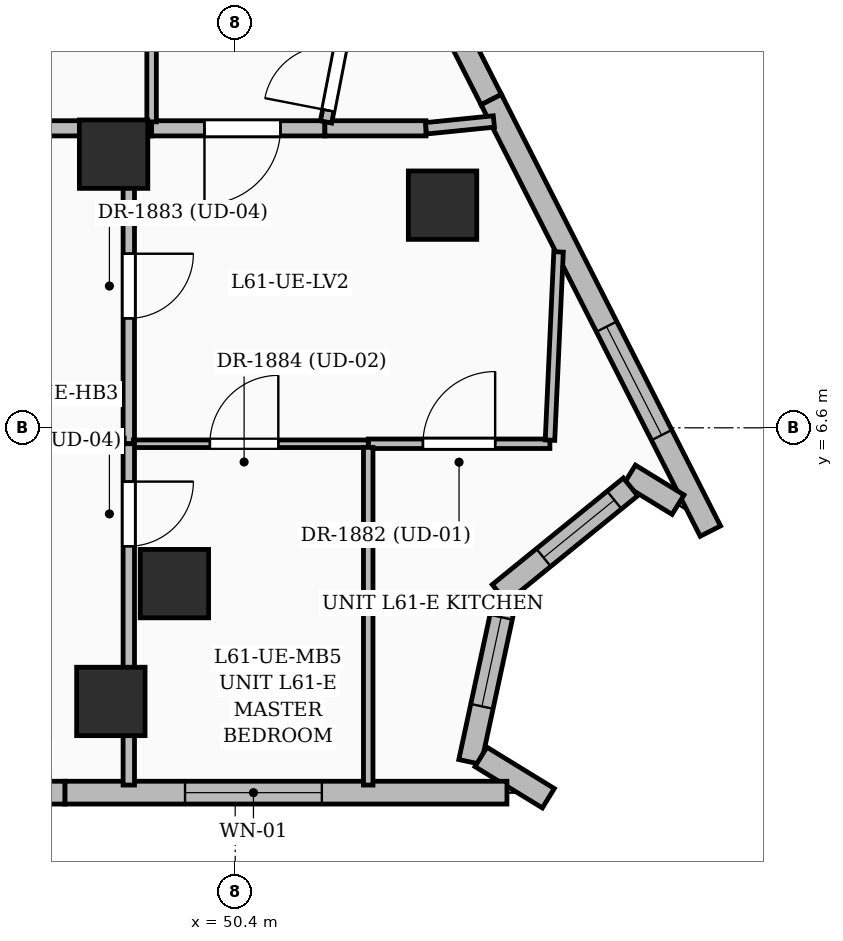
"""IFC4 building model, lengths in metres.
Left out: names, types, materials, properties, quantities, classifications, styles, units other than length and angle.
Written with IfcOpenShell. Run it as: python <this file> out.ifc"""

import sys

from ifc_helpers import new_model, si_unit, direction, frame, frame_2d, origin, origin_2d, place, context, subcontext, project, spatial, rectangle, extrude, element, fill, save


model = new_model("IFC4")
c1 = context("Model", 3, precision=1e-05, world=origin(), true_north=direction((0.0, 1.0)))
c2 = subcontext(c1, "Body", "Model", "MODEL_VIEW")
j1 = project(units=[si_unit("LENGTHUNIT", "METRE"), si_unit("PLANEANGLEUNIT", "RADIAN")], contexts=[c1])
p1 = place(None, origin())
s1 = spatial("IfcSite", under=j1, at=p1, CompositionType="ELEMENT")
p2 = place(p1, origin())
s2 = spatial("IfcBuilding", under=s1, at=p2, CompositionType="ELEMENT")
p3 = place(p2, frame((0.0, 0.0, 237.0)))
s3 = spatial("IfcBuildingStorey", under=s2, at=p3, CompositionType="ELEMENT", Elevation=237.0)
for number, where, z_axis, x_axis in (
    (1, (49.6, 4.55, 0.0), (0.0, 0.0, 1.0), (1.0, 0.0, 0.0)),
    (2, (48.8, 10.2, 0.0), (0.0, 0.0, 1.0), (1.0, 0.0, 0.0)),
    (3, (48.764, 3.0, 0.0), (0.0, 0.0, 1.0), (1.0, 0.0, 0.0)),
    (4, (53.128, 9.529, 0.0), (0.0, 0.0, 1.0), (1.0, 0.0, 0.0)),
):
    element("IfcColumn", number, at=place(p3, frame(where, z_axis=z_axis, x_axis=x_axis)), inside=s3, PredefinedType="COLUMN", context=c2, shape_type="SweptSolid", body=[
        extrude(rectangle(XDim=0.9, YDim=0.9, at=origin_2d()), origin(), (0.0, 0.0, 1.0), 3.75),
    ])
p4 = place(p3, frame((51.01, 16.349, 0.0), z_axis=(0.0, 0.0, 1.0), x_axis=(0.452847757291, -0.891587858103, 0.0)))
e5 = element("IfcWall", 5, at=p4, inside=s3, PredefinedType="SOLIDWALL", context=c2, shape_type="SweptSolid", body=[
    extrude(rectangle(XDim=6.092, YDim=0.3, at=frame_2d((3.046, 0.0))), origin(), (0.0, 0.0, 1.0), 3.5),
])
p5 = place(p4, frame((3.35, 0.0, 0.6)))
e6 = element("IfcOpeningElement", 6, at=p5, cuts=e5, PredefinedType="OPENING", context=c2, shape_type="SweptSolid", body=[
    extrude(rectangle(XDim=1.8, YDim=2.1, at=frame_2d((0.9, 1.05))), frame((0.0, 0.16, 0.0), z_axis=(0.0, -1.0, 0.0), x_axis=(1.0, 0.0, 0.0)), (0.0, 0.0, 1.0), 0.32),
])
p6 = place(p3, frame((53.769, 10.917, 0.0), z_axis=(0.0, 0.0, 1.0), x_axis=(0.452819004825, -0.891602461229, 0.0)))
e7 = element("IfcWall", 7, at=p6, inside=s3, PredefinedType="SOLIDWALL", context=c2, shape_type="SweptSolid", body=[
    extrude(rectangle(XDim=6.366, YDim=0.3, at=frame_2d((3.183, 0.0))), origin(), (0.0, 0.0, 1.0), 3.5),
])
p7 = place(p6, frame((3.35, 0.0, 0.55)))
e8 = element("IfcOpeningElement", 8, at=p7, cuts=e7, PredefinedType="OPENING", context=c2, shape_type="SweptSolid", body=[
    extrude(rectangle(XDim=1.6, YDim=2.2, at=frame_2d((0.8, 1.1))), frame((0.0, 0.16, 0.0), z_axis=(0.0, -1.0, 0.0), x_axis=(1.0, 0.0, 0.0)), (0.0, 0.0, 1.0), 0.32),
])
p8 = place(p3, frame((56.226, 5.588, 0.0), z_axis=(0.0, 0.0, 1.0), x_axis=(-0.851959856167, 0.523607107935, 0.0)))
e9 = element("IfcWall", 9, at=p8, inside=s3, PredefinedType="SOLIDWALL", context=c2, shape_type="SweptSolid", body=[
    extrude(rectangle(XDim=0.75, YDim=0.3, at=frame_2d((0.375, 0.0))), origin(), (0.0, 0.0, 1.0), 3.5),
])
p9 = place(p3, frame((55.601, 5.823, 0.0), z_axis=(0.0, 0.0, 1.0), x_axis=(-0.775969517168, -0.630770408648, 0.0)))
e10 = element("IfcWall", 10, at=p9, inside=s3, PredefinedType="SOLIDWALL", context=c2, shape_type="SweptSolid", body=[
    extrude(rectangle(XDim=2.223, YDim=0.3, at=frame_2d((1.111, 0.0))), origin(), (0.0, 0.0, 1.0), 3.5),
])
p10 = place(p9, frame((0.275, 0.0, 0.8)))
e11 = element("IfcOpeningElement", 11, at=p10, cuts=e10, PredefinedType="OPENING", context=c2, shape_type="SweptSolid", body=[
    extrude(rectangle(XDim=1.2, YDim=1.8, at=frame_2d((0.6, 0.9))), frame((0.0, 0.16, 0.0), z_axis=(0.0, -1.0, 0.0), x_axis=(1.0, 0.0, 0.0)), (0.0, 0.0, 1.0), 0.32),
])
p11 = place(p3, frame((53.951, 4.353, 0.0), z_axis=(0.0, 0.0, 1.0), x_axis=(-0.210621406129, -0.977567707773, 0.0)))
e12 = element("IfcWall", 12, at=p11, inside=s3, PredefinedType="SOLIDWALL", context=c2, shape_type="SweptSolid", body=[
    extrude(rectangle(XDim=2.198, YDim=0.3, at=frame_2d((1.099, 0.0))), origin(), (0.0, 0.0, 1.0), 3.5),
])
p12 = place(p11, frame((0.25, 0.0, 0.8)))
e13 = element("IfcOpeningElement", 13, at=p12, cuts=e12, PredefinedType="OPENING", context=c2, shape_type="SweptSolid", body=[
    extrude(rectangle(XDim=1.2, YDim=1.8, at=frame_2d((0.6, 0.9))), frame((0.0, 0.16, 0.0), z_axis=(0.0, -1.0, 0.0), x_axis=(1.0, 0.0, 0.0)), (0.0, 0.0, 1.0), 0.32),
])
p13 = place(p3, frame((53.633, 2.271, 0.0), z_axis=(0.0, 0.0, 1.0), x_axis=(0.852375061926, -0.522930926421, 0.0)))
e14 = element("IfcWall", 14, at=p13, inside=s3, PredefinedType="SOLIDWALL", context=c2, shape_type="SweptSolid", body=[
    extrude(rectangle(XDim=1.04, YDim=0.3, at=frame_2d((0.52, 0.0))), origin(), (0.0, 0.0, 1.0), 3.5),
])
p14 = place(p3, frame((53.975, 1.8, 0.0), z_axis=(0.0, 0.0, 1.0), x_axis=(-1.0, 0.0, 0.0)))
e15 = element("IfcWall", 15, at=p14, inside=s3, PredefinedType="SOLIDWALL", context=c2, shape_type="SweptSolid", body=[
    extrude(rectangle(XDim=5.816, YDim=0.3, at=frame_2d((2.908, 0.0))), origin(), (0.0, 0.0, 1.0), 3.5),
])
p15 = place(p14, frame((2.435, 0.0, 0.6)))
e16 = element("IfcOpeningElement", 16, at=p15, cuts=e15, PredefinedType="OPENING", context=c2, shape_type="SweptSolid", body=[
    extrude(rectangle(XDim=1.8, YDim=2.1, at=frame_2d((0.9, 1.05))), frame((0.0, 0.16, 0.0), z_axis=(0.0, -1.0, 0.0), x_axis=(1.0, 0.0, 0.0)), (0.0, 0.0, 1.0), 0.32),
])
p16 = place(p3, frame((48.159, 1.8, 0.0), z_axis=(0.0, 0.0, 1.0), x_axis=(-1.0, 0.0, 0.0)))
e17 = element("IfcWall", 17, at=p16, inside=s3, PredefinedType="SOLIDWALL", context=c2, shape_type="SweptSolid", body=[
    extrude(rectangle(XDim=6.381, YDim=0.3, at=frame_2d((3.191, 0.0))), origin(), (0.0, 0.0, 1.0), 3.5),
])
p17 = place(p16, frame((2.85, 0.0, 0.55)))
e18 = element("IfcOpeningElement", 18, at=p17, cuts=e17, PredefinedType="OPENING", context=c2, shape_type="SweptSolid", body=[
    extrude(rectangle(XDim=1.6, YDim=2.2, at=frame_2d((0.8, 1.1))), frame((0.0, 0.16, 0.0), z_axis=(0.0, -1.0, 0.0), x_axis=(1.0, 0.0, 0.0)), (0.0, 0.0, 1.0), 0.32),
])
p18 = place(p3, frame((49.0, 10.54, 0.0), z_axis=(0.0, 0.0, 1.0), x_axis=(0.0, -1.0, 0.0)))
e19 = element("IfcWall", 19, at=p18, inside=s3, PredefinedType="PARTITIONING", context=c2, shape_type="SweptSolid", body=[
    extrude(rectangle(XDim=4.15, YDim=0.15, at=frame_2d((2.075, 0.0))), origin(), (0.0, 0.0, 1.0), 3.5),
])
p19 = place(p18, frame((1.65, 0.0, 0.0)))
e20 = element("IfcOpeningElement", 20, at=p19, cuts=e19, PredefinedType="OPENING", context=c2, shape_type="SweptSolid", body=[
    extrude(rectangle(XDim=0.85, YDim=2.1, at=frame_2d((0.425, 1.05))), frame((0.0, 0.085, 0.0), z_axis=(0.0, -1.0, 0.0), x_axis=(1.0, 0.0, 0.0)), (0.0, 0.0, 1.0), 0.17),
])
p20 = place(p3, frame((52.15, 6.39, 0.0), z_axis=(0.0, 0.0, 1.0), x_axis=(1.0, 0.0, 0.0)))
e21 = element("IfcWall", 21, at=p20, inside=s3, PredefinedType="PARTITIONING", context=c2, shape_type="SweptSolid", body=[
    extrude(rectangle(XDim=2.39, YDim=0.125, at=frame_2d((1.195, 0.0))), origin(), (0.0, 0.0, 1.0), 3.5),
])
p21 = place(p20, frame((0.72, 0.0, 0.0)))
e22 = element("IfcOpeningElement", 22, at=p21, cuts=e21, PredefinedType="OPENING", context=c2, shape_type="SweptSolid", body=[
    extrude(rectangle(XDim=0.95, YDim=2.2, at=frame_2d((0.475, 1.1))), frame((0.0, 0.072, 0.0), z_axis=(0.0, -1.0, 0.0), x_axis=(1.0, 0.0, 0.0)), (0.0, 0.0, 1.0), 0.145),
])
p22 = place(p3, frame((54.541, 6.438, 0.0), z_axis=(0.0, 0.0, 1.0), x_axis=(0.045497001929, 0.998964475252, 0.0)))
e23 = element("IfcWall", 23, at=p22, inside=s3, PredefinedType="PARTITIONING", context=c2, shape_type="SweptSolid", body=[
    extrude(rectangle(XDim=2.479, YDim=0.125, at=frame_2d((1.24, 0.0))), origin(), (0.0, 0.0, 1.0), 3.5),
])
p23 = place(p3, frame((49.06, 6.39, 0.0), z_axis=(0.0, 0.0, 1.0), x_axis=(1.0, 0.0, 0.0)))
e24 = element("IfcWall", 24, at=p23, inside=s3, PredefinedType="PARTITIONING", context=c2, shape_type="SweptSolid", body=[
    extrude(rectangle(XDim=3.09, YDim=0.1, at=frame_2d((1.545, 0.0))), origin(), (0.0, 0.0, 1.0), 2.82),
])
p24 = place(p23, frame((1.007, 0.0, 0.0)))
e25 = element("IfcOpeningElement", 25, at=p24, cuts=e24, PredefinedType="OPENING", context=c2, shape_type="SweptSolid", body=[
    extrude(rectangle(XDim=0.9, YDim=2.15, at=frame_2d((0.45, 1.075))), frame((0.0, 0.06, 0.0), z_axis=(0.0, -1.0, 0.0), x_axis=(1.0, 0.0, 0.0)), (0.0, 0.0, 1.0), 0.12),
])
p25 = place(p3, frame((49.3, 10.54, 0.0), z_axis=(0.0, 0.0, 1.0), x_axis=(-1.0, 0.0, 0.0)))
e26 = element("IfcWall", 26, at=p25, inside=s3, PredefinedType="PARTITIONING", context=c2, shape_type="SweptSolid", body=[
    extrude(rectangle(XDim=0.3, YDim=0.2, at=frame_2d((0.15, 0.0))), origin(), (0.0, 0.0, 1.0), 3.5),
])
p26 = place(p3, frame((51.58, 10.54, 0.0), z_axis=(0.0, 0.0, 1.0), x_axis=(-1.0, 0.0, 0.0)))
e27 = element("IfcWall", 27, at=p26, inside=s3, PredefinedType="PARTITIONING", context=c2, shape_type="SweptSolid", body=[
    extrude(rectangle(XDim=2.28, YDim=0.2, at=frame_2d((1.14, 0.0))), origin(), (0.0, 0.0, 1.0), 3.16),
])
p27 = place(p26, frame((0.584, 0.0, 0.0)))
e28 = element("IfcOpeningElement", 28, at=p27, cuts=e27, PredefinedType="OPENING", context=c2, shape_type="SweptSolid", body=[
    extrude(rectangle(XDim=1.0, YDim=2.2, at=frame_2d((0.5, 1.1))), frame((0.0, 0.11, 0.0), z_axis=(0.0, -1.0, 0.0), x_axis=(1.0, 0.0, 0.0)), (0.0, 0.0, 1.0), 0.22),
])
p28 = place(p3, frame((52.91, 10.54, 0.0), z_axis=(0.0, 0.0, 1.0), x_axis=(-1.0, 0.0, 0.0)))
e29 = element("IfcWall", 29, at=p28, inside=s3, PredefinedType="PARTITIONING", context=c2, shape_type="SweptSolid", body=[
    extrude(rectangle(XDim=1.33, YDim=0.2, at=frame_2d((0.665, 0.0))), origin(), (0.0, 0.0, 1.0), 2.82),
])
p29 = place(p3, frame((47.35, 6.39, 0.0), z_axis=(0.0, 0.0, 1.0), x_axis=(1.0, 0.0, 0.0)))
e30 = element("IfcWall", 30, at=p29, inside=s3, PredefinedType="PARTITIONING", context=c2, shape_type="SweptSolid", body=[
    extrude(rectangle(XDim=1.59, YDim=0.15, at=frame_2d((0.795, 0.0))), origin(), (0.0, 0.0, 1.0), 2.685),
])
p30 = place(p3, frame((48.94, 10.54, 0.0), z_axis=(0.0, 0.0, 1.0), x_axis=(-1.0, 0.0, 0.0)))
e31 = element("IfcWall", 31, at=p30, inside=s3, PredefinedType="PARTITIONING", context=c2, shape_type="SweptSolid", body=[
    extrude(rectangle(XDim=1.59, YDim=0.2, at=frame_2d((0.795, 0.0))), origin(), (0.0, 0.0, 1.0), 3.5),
])
p31 = place(p3, frame((52.15, 6.343, 0.0), z_axis=(0.0, 0.0, 1.0), x_axis=(0.0, -1.0, 0.0)))
e32 = element("IfcWall", 32, at=p31, inside=s3, PredefinedType="PARTITIONING", context=c2, shape_type="SweptSolid", body=[
    extrude(rectangle(XDim=4.443, YDim=0.125, at=frame_2d((2.221, 0.0))), origin(), (0.0, 0.0, 1.0), 3.5),
])
p32 = place(p3, frame((49.0, 6.39, 0.0), z_axis=(0.0, 0.0, 1.0), x_axis=(0.0, -1.0, 0.0)))
e33 = element("IfcWall", 33, at=p32, inside=s3, PredefinedType="PARTITIONING", context=c2, shape_type="SweptSolid", body=[
    extrude(rectangle(XDim=4.49, YDim=0.15, at=frame_2d((2.245, 0.0))), origin(), (0.0, 0.0, 1.0), 2.685),
])
p33 = place(p32, frame((0.498, 0.0, 0.0)))
e34 = element("IfcOpeningElement", 34, at=p33, cuts=e33, PredefinedType="OPENING", context=c2, shape_type="SweptSolid", body=[
    extrude(rectangle(XDim=0.85, YDim=2.1, at=frame_2d((0.425, 1.05))), frame((0.0, 0.085, 0.0), z_axis=(0.0, -1.0, 0.0), x_axis=(1.0, 0.0, 0.0)), (0.0, 0.0, 1.0), 0.17),
])
p34 = place(p3, frame((49.3, 10.625, 0.0), z_axis=(0.0, 0.0, 1.0), x_axis=(0.0, 1.0, 0.0)))
e35 = element("IfcWall", 35, at=p34, inside=s3, PredefinedType="PARTITIONING", context=c2, shape_type="SweptSolid", body=[
    extrude(rectangle(XDim=3.055, YDim=0.125, at=frame_2d((1.527, 0.0))), origin(), (0.0, 0.0, 1.0), 3.16),
])
p35 = place(p34, frame((1.01, 0.0, 0.0)))
e36 = element("IfcOpeningElement", 36, at=p35, cuts=e35, PredefinedType="OPENING", context=c2, shape_type="SweptSolid", body=[
    extrude(rectangle(XDim=0.95, YDim=2.2, at=frame_2d((0.475, 1.1))), frame((0.0, 0.072, 0.0), z_axis=(0.0, -1.0, 0.0), x_axis=(1.0, 0.0, 0.0)), (0.0, 0.0, 1.0), 0.145),
])
p36 = place(p3, frame((51.595, 10.624, 0.0), z_axis=(0.0, 0.0, 1.0), x_axis=(0.190970447777, 0.981595786501, 0.0)))
e37 = element("IfcWall", 37, at=p36, inside=s3, PredefinedType="PARTITIONING", context=c2, shape_type="SweptSolid", body=[
    extrude(rectangle(XDim=3.177, YDim=0.15, at=frame_2d((1.588, 0.0))), origin(), (0.0, 0.0, 1.0), 2.82),
])
p37 = place(p36, frame((0.154, 0.0, 0.0)))
e38 = element("IfcOpeningElement", 38, at=p37, cuts=e37, PredefinedType="OPENING", context=c2, shape_type="SweptSolid", body=[
    extrude(rectangle(XDim=0.85, YDim=2.1, at=frame_2d((0.425, 1.05))), frame((0.0, 0.085, 0.0), z_axis=(0.0, -1.0, 0.0), x_axis=(1.0, 0.0, 0.0)), (0.0, 0.0, 1.0), 0.17),
])
p38 = place(p3, frame((52.91, 10.54, 0.0), z_axis=(0.0, 0.0, 1.0), x_axis=(0.994977766191, 0.100096177681, 0.0)))
e39 = element("IfcWall", 39, at=p38, inside=s3, PredefinedType="PARTITIONING", context=c2, shape_type="SweptSolid", body=[
    extrude(rectangle(XDim=0.897, YDim=0.15, at=frame_2d((0.449, 0.0))), origin(), (0.0, 0.0, 1.0), 3.5),
])
p39 = place(p7, origin())
e40 = element("IfcWindow", 40, at=p39, inside=s3, PartitioningType="SINGLE_PANEL", PredefinedType="WINDOW", context=c2, shape_type="SweptSolid", body=[
    extrude(rectangle(XDim=1.6, YDim=2.2, at=frame_2d((0.8, 1.1))), frame((0.0, 0.03, 0.0), z_axis=(0.0, -1.0, 0.0), x_axis=(1.0, 0.0, 0.0)), (0.0, 0.0, 1.0), 0.06),
])
fill(e8, e40)
p40 = place(p10, origin())
e41 = element("IfcWindow", 41, at=p40, inside=s3, PartitioningType="SINGLE_PANEL", PredefinedType="WINDOW", context=c2, shape_type="SweptSolid", body=[
    extrude(rectangle(XDim=1.2, YDim=1.8, at=frame_2d((0.6, 0.9))), frame((0.0, 0.03, 0.0), z_axis=(0.0, -1.0, 0.0), x_axis=(1.0, 0.0, 0.0)), (0.0, 0.0, 1.0), 0.06),
])
fill(e11, e41)
p41 = place(p12, origin())
e42 = element("IfcWindow", 42, at=p41, inside=s3, PartitioningType="SINGLE_PANEL", PredefinedType="WINDOW", context=c2, shape_type="SweptSolid", body=[
    extrude(rectangle(XDim=1.2, YDim=1.8, at=frame_2d((0.6, 0.9))), frame((0.0, 0.03, 0.0), z_axis=(0.0, -1.0, 0.0), x_axis=(1.0, 0.0, 0.0)), (0.0, 0.0, 1.0), 0.06),
])
fill(e13, e42)
p42 = place(p15, origin())
e43 = element("IfcWindow", 43, at=p42, inside=s3, PartitioningType="SINGLE_PANEL", PredefinedType="WINDOW", context=c2, shape_type="SweptSolid", body=[
    extrude(rectangle(XDim=1.8, YDim=2.1, at=frame_2d((0.9, 1.05))), frame((0.0, 0.03, 0.0), z_axis=(0.0, -1.0, 0.0), x_axis=(1.0, 0.0, 0.0)), (0.0, 0.0, 1.0), 0.06),
])
fill(e16, e43)
p43 = place(p21, origin())
e44 = element("IfcDoor", 44, at=p43, inside=s3, OperationType="SINGLE_SWING_RIGHT", PredefinedType="DOOR", context=c2, shape_type="SweptSolid", body=[
    extrude(rectangle(XDim=0.95, YDim=2.2, at=frame_2d((0.475, 1.1))), frame((0.0, 0.025, 0.0), z_axis=(0.0, -1.0, 0.0), x_axis=(1.0, 0.0, 0.0)), (0.0, 0.0, 1.0), 0.05),
])
fill(e22, e44)
p44 = place(p19, origin())
e45 = element("IfcDoor", 45, at=p44, inside=s3, OperationType="SINGLE_SWING_LEFT", PredefinedType="DOOR", context=c2, shape_type="SweptSolid", body=[
    extrude(rectangle(XDim=0.85, YDim=2.1, at=frame_2d((0.425, 1.05))), frame((0.0, 0.025, 0.0), z_axis=(0.0, -1.0, 0.0), x_axis=(1.0, 0.0, 0.0)), (0.0, 0.0, 1.0), 0.05),
])
fill(e20, e45)
p45 = place(p24, origin())
e46 = element("IfcDoor", 46, at=p45, inside=s3, OperationType="SINGLE_SWING_RIGHT", PredefinedType="DOOR", context=c2, shape_type="SweptSolid", body=[
    extrude(rectangle(XDim=0.9, YDim=2.15, at=frame_2d((0.45, 1.075))), frame((0.0, 0.025, 0.0), z_axis=(0.0, -1.0, 0.0), x_axis=(1.0, 0.0, 0.0)), (0.0, 0.0, 1.0), 0.05),
])
fill(e25, e46)
p46 = place(p33, origin())
e47 = element("IfcDoor", 47, at=p46, inside=s3, OperationType="SINGLE_SWING_LEFT", PredefinedType="DOOR", context=c2, shape_type="SweptSolid", body=[
    extrude(rectangle(XDim=0.85, YDim=2.1, at=frame_2d((0.425, 1.05))), frame((0.0, 0.025, 0.0), z_axis=(0.0, -1.0, 0.0), x_axis=(1.0, 0.0, 0.0)), (0.0, 0.0, 1.0), 0.05),
])
fill(e34, e47)
p47 = place(p37, origin())
e48 = element("IfcDoor", 48, at=p47, inside=s3, OperationType="SINGLE_SWING_LEFT", PredefinedType="DOOR", context=c2, shape_type="SweptSolid", body=[
    extrude(rectangle(XDim=0.85, YDim=2.1, at=frame_2d((0.425, 1.05))), frame((0.0, 0.025, 0.0), z_axis=(0.0, -1.0, 0.0), x_axis=(1.0, 0.0, 0.0)), (0.0, 0.0, 1.0), 0.05),
])
fill(e38, e48)
p48 = place(p27, origin())
e49 = element("IfcDoor", 49, at=p48, inside=s3, OperationType="SINGLE_SWING_RIGHT", PredefinedType="DOOR", context=c2, shape_type="SweptSolid", body=[
    extrude(rectangle(XDim=1.0, YDim=2.2, at=frame_2d((0.5, 1.1))), frame((0.0, 0.025, 0.0), z_axis=(0.0, -1.0, 0.0), x_axis=(1.0, 0.0, 0.0)), (0.0, 0.0, 1.0), 0.05),
])
fill(e28, e49)
save(model, sys.argv[1])
